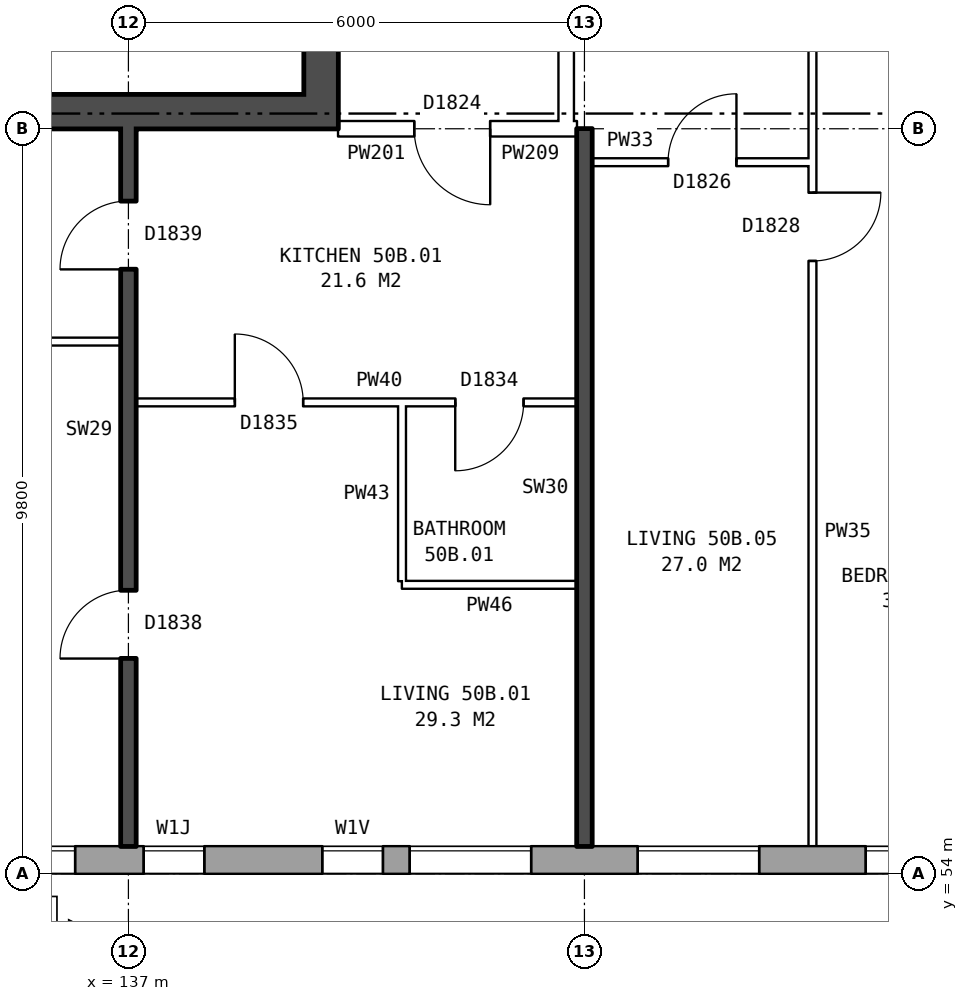
"""IFC4 building model, lengths in metres.
Left out: names, types, materials, properties, quantities, classifications, styles, units other than length and angle.
Written with IfcOpenShell. Run it as: python <this file> out.ifc"""

import sys

from ifc_helpers import new_model, si_unit, direction, frame, frame_2d, origin, place, context, subcontext, project, spatial, rectangle, extrude, element, fill, save


model = new_model("IFC4")
c1 = context("Model", 3, precision=1e-05, world=origin(), true_north=direction((0.0, 1.0)))
c2 = subcontext(c1, "Body", "Model", "MODEL_VIEW")
j1 = project(units=[si_unit("LENGTHUNIT", "METRE"), si_unit("PLANEANGLEUNIT", "RADIAN")], contexts=[c1])
p1 = place(None, origin())
s1 = spatial("IfcSite", under=j1, at=p1, CompositionType="ELEMENT")
p2 = place(p1, origin())
s2 = spatial("IfcBuilding", under=s1, at=p2, CompositionType="ELEMENT")
p3 = place(p2, frame((0.0, 0.0, 178.9)))
s3 = spatial("IfcBuildingStorey", under=s2, at=p3, CompositionType="ELEMENT", Elevation=178.9)
p4 = place(p3, frame((134.075, 54.18, 0.0), z_axis=(0.0, 0.0, 1.0), x_axis=(1.0, 0.0, 0.0)))
e1 = element("IfcWall", 1, at=p4, inside=s3, PredefinedType="STANDARD", context=c2, shape_type="SweptSolid", body=[
    extrude(rectangle(XDim=33.101, YDim=0.36, at=frame_2d((16.55, 0.0))), origin(), (0.0, 0.0, 1.0), 2.85),
])
p5 = place(p4, frame((0.625, 0.0, 0.8)))
e2 = element("IfcOpeningElement", 2, at=p5, cuts=e1, PredefinedType="OPENING", context=c2, shape_type="SweptSolid", body=[
    extrude(rectangle(XDim=1.6, YDim=1.8, at=frame_2d((0.8, 0.9))), frame((0.0, 0.19, 0.0), z_axis=(0.0, -1.0, 0.0), x_axis=(1.0, 0.0, 0.0)), (0.0, 0.0, 1.0), 0.38),
])
p6 = place(p4, frame((3.125, 0.0, 1.1)))
e3 = element("IfcOpeningElement", 3, at=p6, cuts=e1, PredefinedType="OPENING", context=c2, shape_type="SweptSolid", body=[
    extrude(rectangle(XDim=0.8, YDim=1.5, at=frame_2d((0.4, 0.75))), frame((0.0, 0.19, 0.0), z_axis=(0.0, -1.0, 0.0), x_axis=(1.0, 0.0, 0.0)), (0.0, 0.0, 1.0), 0.38),
])
p7 = place(p4, frame((6.625, 0.0, 0.8)))
e4 = element("IfcOpeningElement", 4, at=p7, cuts=e1, PredefinedType="OPENING", context=c2, shape_type="SweptSolid", body=[
    extrude(rectangle(XDim=1.6, YDim=1.8, at=frame_2d((0.8, 0.9))), frame((0.0, 0.19, 0.0), z_axis=(0.0, -1.0, 0.0), x_axis=(1.0, 0.0, 0.0)), (0.0, 0.0, 1.0), 0.38),
])
p8 = place(p4, frame((9.625, 0.0, 0.8)))
e5 = element("IfcOpeningElement", 5, at=p8, cuts=e1, PredefinedType="OPENING", context=c2, shape_type="SweptSolid", body=[
    extrude(rectangle(XDim=1.6, YDim=1.8, at=frame_2d((0.8, 0.9))), frame((0.0, 0.19, 0.0), z_axis=(0.0, -1.0, 0.0), x_axis=(1.0, 0.0, 0.0)), (0.0, 0.0, 1.0), 0.38),
])
p9 = place(p4, frame((12.625, 0.0, 0.8)))
e6 = element("IfcOpeningElement", 6, at=p9, cuts=e1, PredefinedType="OPENING", context=c2, shape_type="SweptSolid", body=[
    extrude(rectangle(XDim=1.6, YDim=1.8, at=frame_2d((0.8, 0.9))), frame((0.0, 0.19, 0.0), z_axis=(0.0, -1.0, 0.0), x_axis=(1.0, 0.0, 0.0)), (0.0, 0.0, 1.0), 0.38),
])
p10 = place(p4, frame((15.625, 0.0, 0.8)))
e7 = element("IfcOpeningElement", 7, at=p10, cuts=e1, PredefinedType="OPENING", context=c2, shape_type="SweptSolid", body=[
    extrude(rectangle(XDim=1.6, YDim=1.8, at=frame_2d((0.8, 0.9))), frame((0.0, 0.19, 0.0), z_axis=(0.0, -1.0, 0.0), x_axis=(1.0, 0.0, 0.0)), (0.0, 0.0, 1.0), 0.38),
])
p11 = place(p4, frame((18.625, 0.0, 0.8)))
e8 = element("IfcOpeningElement", 8, at=p11, cuts=e1, PredefinedType="OPENING", context=c2, shape_type="SweptSolid", body=[
    extrude(rectangle(XDim=1.6, YDim=1.8, at=frame_2d((0.8, 0.9))), frame((0.0, 0.19, 0.0), z_axis=(0.0, -1.0, 0.0), x_axis=(1.0, 0.0, 0.0)), (0.0, 0.0, 1.0), 0.38),
])
p12 = place(p4, frame((21.625, 0.0, 0.8)))
e9 = element("IfcOpeningElement", 9, at=p12, cuts=e1, PredefinedType="OPENING", context=c2, shape_type="SweptSolid", body=[
    extrude(rectangle(XDim=1.6, YDim=1.8, at=frame_2d((0.8, 0.9))), frame((0.0, 0.19, 0.0), z_axis=(0.0, -1.0, 0.0), x_axis=(1.0, 0.0, 0.0)), (0.0, 0.0, 1.0), 0.38),
])
p13 = place(p4, frame((24.625, 0.0, 0.8)))
e10 = element("IfcOpeningElement", 10, at=p13, cuts=e1, PredefinedType="OPENING", context=c2, shape_type="SweptSolid", body=[
    extrude(rectangle(XDim=1.6, YDim=1.8, at=frame_2d((0.8, 0.9))), frame((0.0, 0.19, 0.0), z_axis=(0.0, -1.0, 0.0), x_axis=(1.0, 0.0, 0.0)), (0.0, 0.0, 1.0), 0.38),
])
p14 = place(p4, frame((28.625, 0.0, 1.7)))
e11 = element("IfcOpeningElement", 11, at=p14, cuts=e1, PredefinedType="OPENING", context=c2, shape_type="SweptSolid", body=[
    extrude(rectangle(XDim=0.6, YDim=0.9, at=frame_2d((0.3, 0.45))), frame((0.0, 0.19, 0.0), z_axis=(0.0, -1.0, 0.0), x_axis=(1.0, 0.0, 0.0)), (0.0, 0.0, 1.0), 0.38),
])
p15 = place(p4, frame((30.625, 0.0, 0.8)))
e12 = element("IfcOpeningElement", 12, at=p15, cuts=e1, PredefinedType="OPENING", context=c2, shape_type="SweptSolid", body=[
    extrude(rectangle(XDim=1.6, YDim=1.8, at=frame_2d((0.8, 0.9))), frame((0.0, 0.19, 0.0), z_axis=(0.0, -1.0, 0.0), x_axis=(1.0, 0.0, 0.0)), (0.0, 0.0, 1.0), 0.38),
])
p16 = place(p4, frame((5.475, 0.0, 0.8)))
e13 = element("IfcOpeningElement", 13, at=p16, cuts=e1, PredefinedType="OPENING", context=c2, shape_type="SweptSolid", body=[
    extrude(rectangle(XDim=0.8, YDim=0.9, at=frame_2d((0.4, 0.45))), frame((0.0, 0.19, 0.0), z_axis=(0.0, -1.0, 0.0), x_axis=(1.0, 0.0, 0.0)), (0.0, 0.0, 1.0), 0.38),
])
p17 = place(p4, frame((29.525, 0.0, 0.8)))
e14 = element("IfcOpeningElement", 14, at=p17, cuts=e1, PredefinedType="OPENING", context=c2, shape_type="SweptSolid", body=[
    extrude(rectangle(XDim=0.8, YDim=1.8, at=frame_2d((0.4, 0.9))), frame((0.0, 0.19, 0.0), z_axis=(0.0, -1.0, 0.0), x_axis=(1.0, 0.0, 0.0)), (0.0, 0.0, 1.0), 0.38),
])
p18 = place(p3, frame((139.535, 63.8, 0.0), z_axis=(0.0, 0.0, 1.0), x_axis=(0.0, 1.0, 0.0)))
e15 = element("IfcWall", 15, at=p18, inside=s3, PredefinedType="SHEAR", context=c2, shape_type="SweptSolid", body=[
    extrude(rectangle(XDim=12.4, YDim=0.45, at=frame_2d((6.2, 0.0))), origin(), (0.0, 0.0, 1.0), 2.85),
])
p19 = place(p18, frame((1.325, 0.0, 0.0)))
e16 = element("IfcOpeningElement", 16, at=p19, cuts=e15, PredefinedType="OPENING", context=c2, shape_type="SweptSolid", body=[
    extrude(rectangle(XDim=1.1, YDim=2.1, at=frame_2d((0.55, 1.05))), frame((0.0, 0.235, 0.0), z_axis=(0.0, -1.0, 0.0), x_axis=(1.0, 0.0, 0.0)), (0.0, 0.0, 1.0), 0.47),
])
p20 = place(p18, frame((3.6, 0.0, 0.0)))
e17 = element("IfcOpeningElement", 17, at=p20, cuts=e15, PredefinedType="OPENING", context=c2, shape_type="SweptSolid", body=[
    extrude(rectangle(XDim=1.1, YDim=2.1, at=frame_2d((0.55, 1.05))), frame((0.0, 0.235, 0.0), z_axis=(0.0, -1.0, 0.0), x_axis=(1.0, 0.0, 0.0)), (0.0, 0.0, 1.0), 0.47),
])
p21 = place(p18, frame((5.8, 0.0, 0.0)))
e18 = element("IfcOpeningElement", 18, at=p21, cuts=e15, PredefinedType="OPENING", context=c2, shape_type="SweptSolid", body=[
    extrude(rectangle(XDim=1.1, YDim=2.1, at=frame_2d((0.55, 1.05))), frame((0.0, 0.235, 0.0), z_axis=(0.0, -1.0, 0.0), x_axis=(1.0, 0.0, 0.0)), (0.0, 0.0, 1.0), 0.47),
])
p22 = place(p18, frame((9.9, 0.0, 0.0)))
e19 = element("IfcOpeningElement", 19, at=p22, cuts=e15, PredefinedType="OPENING", context=c2, shape_type="SweptSolid", body=[
    extrude(rectangle(XDim=1.1, YDim=2.1, at=frame_2d((0.55, 1.05))), frame((0.0, 0.235, 0.0), z_axis=(0.0, -1.0, 0.0), x_axis=(1.0, 0.0, 0.0)), (0.0, 0.0, 1.0), 0.47),
])
p23 = place(p18, frame((8.125, 0.0, 0.0)))
e20 = element("IfcOpeningElement", 20, at=p23, cuts=e15, PredefinedType="OPENING", context=c2, shape_type="SweptSolid", body=[
    extrude(rectangle(XDim=0.85, YDim=2.1, at=frame_2d((0.425, 1.05))), frame((0.0, 0.235, 0.0), z_axis=(0.0, -1.0, 0.0), x_axis=(1.0, 0.0, 0.0)), (0.0, 0.0, 1.0), 0.47),
])
p24 = place(p3, frame((139.31, 64.025, 0.0), z_axis=(0.0, 0.0, 1.0), x_axis=(-1.0, 0.0, 0.0)))
e21 = element("IfcWall", 21, at=p24, inside=s3, PredefinedType="SHEAR", context=c2, shape_type="SweptSolid", body=[
    extrude(rectangle(XDim=7.5, YDim=0.45, at=frame_2d((3.75, 0.0))), origin(), (0.0, 0.0, 1.0), 2.85),
])
p25 = place(p3, frame((142.76, 63.9, 0.0), z_axis=(0.0, 0.0, 1.0), x_axis=(0.0, 1.0, 0.0)))
e22 = element("IfcWall", 22, at=p25, inside=s3, PredefinedType="PARTITIONING", context=c2, shape_type="SweptSolid", body=[
    extrude(rectangle(XDim=12.2, YDim=0.2, at=frame_2d((6.1, 0.0))), origin(), (0.0, 0.0, 1.0), 2.85),
])
p26 = place(p25, frame((5.1, 0.0, 0.0)))
e23 = element("IfcOpeningElement", 23, at=p26, cuts=e22, PredefinedType="OPENING", context=c2, shape_type="SweptSolid", body=[
    extrude(rectangle(XDim=2.0, YDim=2.1, at=frame_2d((1.0, 1.05))), frame((0.0, 0.11, 0.0), z_axis=(0.0, -1.0, 0.0), x_axis=(1.0, 0.0, 0.0)), (0.0, 0.0, 1.0), 0.22),
])
p27 = place(p3, frame((140.6, 57.8, 0.0), z_axis=(0.0, 0.0, 1.0), x_axis=(1.0, 0.0, 0.0)))
e24 = element("IfcWall", 24, at=p27, inside=s3, PredefinedType="PARTITIONING", context=c2, shape_type="SweptSolid", body=[
    extrude(rectangle(XDim=2.3, YDim=0.1, at=frame_2d((1.15, 0.0))), origin(), (0.0, 0.0, 1.0), 2.85),
])
p28 = place(p3, frame((137.1, 60.2, 0.0), z_axis=(0.0, 0.0, 1.0), x_axis=(1.0, 0.0, 0.0)))
e25 = element("IfcWall", 25, at=p28, inside=s3, PredefinedType="PARTITIONING", context=c2, shape_type="SweptSolid", body=[
    extrude(rectangle(XDim=5.8, YDim=0.1, at=frame_2d((2.9, 0.0))), origin(), (0.0, 0.0, 1.0), 2.85),
])
p29 = place(p28, frame((1.3, 0.0, 0.0)))
e26 = element("IfcOpeningElement", 26, at=p29, cuts=e25, PredefinedType="OPENING", context=c2, shape_type="SweptSolid", body=[
    extrude(rectangle(XDim=0.9, YDim=2.1, at=frame_2d((0.45, 1.05))), frame((0.0, 0.06, 0.0), z_axis=(0.0, -1.0, 0.0), x_axis=(1.0, 0.0, 0.0)), (0.0, 0.0, 1.0), 0.12),
])
p30 = place(p28, frame((4.2, 0.0, 0.0)))
e27 = element("IfcOpeningElement", 27, at=p30, cuts=e25, PredefinedType="OPENING", context=c2, shape_type="SweptSolid", body=[
    extrude(rectangle(XDim=0.9, YDim=2.1, at=frame_2d((0.45, 1.05))), frame((0.0, 0.06, 0.0), z_axis=(0.0, -1.0, 0.0), x_axis=(1.0, 0.0, 0.0)), (0.0, 0.0, 1.0), 0.12),
])
p31 = place(p3, frame((131.36, 61.0, 0.0), z_axis=(0.0, 0.0, 1.0), x_axis=(1.0, 0.0, 0.0)))
e28 = element("IfcWall", 28, at=p31, inside=s3, PredefinedType="PARTITIONING", context=c2, shape_type="SweptSolid", body=[
    extrude(rectangle(XDim=5.54, YDim=0.1, at=frame_2d((2.77, 0.0))), origin(), (0.0, 0.0, 1.0), 2.85),
])
p32 = place(p3, frame((143.1, 63.36, 0.0), z_axis=(0.0, 0.0, 1.0), x_axis=(1.0, 0.0, 0.0)))
e29 = element("IfcWall", 29, at=p32, inside=s3, PredefinedType="PARTITIONING", context=c2, shape_type="SweptSolid", body=[
    extrude(rectangle(XDim=2.9, YDim=0.1, at=frame_2d((1.45, 0.0))), origin(), (0.0, 0.0, 1.0), 2.85),
])
p33 = place(p32, frame((1.0, 0.0, 0.0)))
e30 = element("IfcOpeningElement", 30, at=p33, cuts=e29, PredefinedType="OPENING", context=c2, shape_type="SweptSolid", body=[
    extrude(rectangle(XDim=0.9, YDim=2.1, at=frame_2d((0.45, 1.05))), frame((0.0, 0.06, 0.0), z_axis=(0.0, -1.0, 0.0), x_axis=(1.0, 0.0, 0.0)), (0.0, 0.0, 1.0), 0.12),
])
p34 = place(p3, frame((139.76, 63.8, 0.0), z_axis=(0.0, 0.0, 1.0), x_axis=(1.0, 0.0, 0.0)))
e31 = element("IfcWall", 31, at=p34, inside=s3, PredefinedType="PARTITIONING", context=c2, shape_type="SweptSolid", body=[
    extrude(rectangle(XDim=3.0, YDim=0.2, at=frame_2d((1.5, 0.0))), origin(), (0.0, 0.0, 1.0), 2.85),
])
p35 = place(p34, frame((1.0, 0.0, 0.0)))
e32 = element("IfcOpeningElement", 32, at=p35, cuts=e31, PredefinedType="OPENING", context=c2, shape_type="SweptSolid", body=[
    extrude(rectangle(XDim=1.0, YDim=2.1, at=frame_2d((0.5, 1.05))), frame((0.0, 0.11, 0.0), z_axis=(0.0, -1.0, 0.0), x_axis=(1.0, 0.0, 0.0)), (0.0, 0.0, 1.0), 0.22),
])
p36 = place(p3, frame((142.76, 63.8, 0.0), z_axis=(0.0, 0.0, 1.0), x_axis=(1.0, 0.0, 0.0)))
e33 = element("IfcWall", 33, at=p36, inside=s3, PredefinedType="PARTITIONING", context=c2, shape_type="SweptSolid", body=[
    extrude(rectangle(XDim=0.14, YDim=0.2, at=frame_2d((0.07, 0.0))), origin(), (0.0, 0.0, 1.0), 2.85),
])
p37 = place(p3, frame((137.0, 54.36, 0.0), z_axis=(0.0, 0.0, 1.0), x_axis=(0.0, 1.0, 0.0)))
e34 = element("IfcWall", 34, at=p37, inside=s3, PredefinedType="SOLIDWALL", context=c2, shape_type="SweptSolid", body=[
    extrude(rectangle(XDim=9.44, YDim=0.2, at=frame_2d((4.72, 0.0))), origin(), (0.0, 0.0, 1.0), 2.85),
])
p38 = place(p37, frame((2.47, 0.0, 0.0)))
e35 = element("IfcOpeningElement", 35, at=p38, cuts=e34, PredefinedType="OPENING", context=c2, shape_type="SweptSolid", body=[
    extrude(rectangle(XDim=0.9, YDim=2.1, at=frame_2d((0.45, 1.05))), frame((0.0, 0.11, 0.0), z_axis=(0.0, -1.0, 0.0), x_axis=(1.0, 0.0, 0.0)), (0.0, 0.0, 1.0), 0.22),
])
p39 = place(p37, frame((7.59, 0.0, 0.0)))
e36 = element("IfcOpeningElement", 36, at=p39, cuts=e34, PredefinedType="OPENING", context=c2, shape_type="SweptSolid", body=[
    extrude(rectangle(XDim=0.9, YDim=2.1, at=frame_2d((0.45, 1.05))), frame((0.0, 0.11, 0.0), z_axis=(0.0, -1.0, 0.0), x_axis=(1.0, 0.0, 0.0)), (0.0, 0.0, 1.0), 0.22),
])
p40 = place(p3, frame((140.6, 57.85, 0.0), z_axis=(0.0, 0.0, 1.0), x_axis=(0.0, 1.0, 0.0)))
e37 = element("IfcWall", 37, at=p40, inside=s3, PredefinedType="PARTITIONING", context=c2, shape_type="SweptSolid", body=[
    extrude(rectangle(XDim=2.3, YDim=0.1, at=frame_2d((1.15, 0.0))), origin(), (0.0, 0.0, 1.0), 2.85),
])
p41 = place(p3, frame((143.0, 54.36, 0.0), z_axis=(0.0, 0.0, 1.0), x_axis=(0.0, 1.0, 0.0)))
e38 = element("IfcWall", 38, at=p41, inside=s3, PredefinedType="SOLIDWALL", context=c2, shape_type="SweptSolid", body=[
    extrude(rectangle(XDim=9.44, YDim=0.2, at=frame_2d((4.72, 0.0))), origin(), (0.0, 0.0, 1.0), 2.85),
])
p42 = place(p3, frame((146.0, 54.36, 0.0), z_axis=(0.0, 0.0, 1.0), x_axis=(0.0, 1.0, 0.0)))
e39 = element("IfcWall", 39, at=p42, inside=s3, PredefinedType="PARTITIONING", context=c2, shape_type="SweptSolid", body=[
    extrude(rectangle(XDim=14.34, YDim=0.1, at=frame_2d((7.17, 0.0))), origin(), (0.0, 0.0, 1.0), 2.85),
])
p43 = place(p42, frame((7.7, 0.0, 0.0)))
e40 = element("IfcOpeningElement", 40, at=p43, cuts=e39, PredefinedType="OPENING", context=c2, shape_type="SweptSolid", body=[
    extrude(rectangle(XDim=0.9, YDim=2.1, at=frame_2d((0.45, 1.05))), frame((0.0, 0.06, 0.0), z_axis=(0.0, -1.0, 0.0), x_axis=(1.0, 0.0, 0.0)), (0.0, 0.0, 1.0), 0.12),
])
p44 = place(p42, frame((13.04, 0.0, 0.0)))
e41 = element("IfcOpeningElement", 41, at=p44, cuts=e39, PredefinedType="OPENING", context=c2, shape_type="SweptSolid", body=[
    extrude(rectangle(XDim=0.9, YDim=2.1, at=frame_2d((0.45, 1.05))), frame((0.0, 0.06, 0.0), z_axis=(0.0, -1.0, 0.0), x_axis=(1.0, 0.0, 0.0)), (0.0, 0.0, 1.0), 0.12),
])
p45 = place(p5, origin())
e42 = element("IfcWindow", 42, at=p45, inside=s3, PartitioningType="SINGLE_PANEL", PredefinedType="WINDOW", context=c2, shape_type="SweptSolid", body=[
    extrude(rectangle(XDim=1.6, YDim=1.8, at=frame_2d((0.8, 0.9))), frame((0.0, 0.15, 0.0), z_axis=(0.0, -1.0, 0.0), x_axis=(1.0, 0.0, 0.0)), (0.0, 0.0, 1.0), 0.06),
])
fill(e2, e42)
p46 = place(p6, origin())
e43 = element("IfcWindow", 43, at=p46, inside=s3, PartitioningType="SINGLE_PANEL", PredefinedType="WINDOW", context=c2, shape_type="SweptSolid", body=[
    extrude(rectangle(XDim=0.8, YDim=1.5, at=frame_2d((0.4, 0.75))), frame((0.0, 0.15, 0.0), z_axis=(0.0, -1.0, 0.0), x_axis=(1.0, 0.0, 0.0)), (0.0, 0.0, 1.0), 0.06),
])
fill(e3, e43)
p47 = place(p7, origin())
e44 = element("IfcWindow", 44, at=p47, inside=s3, PartitioningType="SINGLE_PANEL", PredefinedType="WINDOW", context=c2, shape_type="SweptSolid", body=[
    extrude(rectangle(XDim=1.6, YDim=1.8, at=frame_2d((0.8, 0.9))), frame((0.0, 0.15, 0.0), z_axis=(0.0, -1.0, 0.0), x_axis=(1.0, 0.0, 0.0)), (0.0, 0.0, 1.0), 0.06),
])
fill(e4, e44)
p48 = place(p8, origin())
e45 = element("IfcWindow", 45, at=p48, inside=s3, PartitioningType="SINGLE_PANEL", PredefinedType="WINDOW", context=c2, shape_type="SweptSolid", body=[
    extrude(rectangle(XDim=1.6, YDim=1.8, at=frame_2d((0.8, 0.9))), frame((0.0, 0.15, 0.0), z_axis=(0.0, -1.0, 0.0), x_axis=(1.0, 0.0, 0.0)), (0.0, 0.0, 1.0), 0.06),
])
fill(e5, e45)
p49 = place(p9, origin())
e46 = element("IfcWindow", 46, at=p49, inside=s3, PartitioningType="SINGLE_PANEL", PredefinedType="WINDOW", context=c2, shape_type="SweptSolid", body=[
    extrude(rectangle(XDim=1.6, YDim=1.8, at=frame_2d((0.8, 0.9))), frame((0.0, 0.15, 0.0), z_axis=(0.0, -1.0, 0.0), x_axis=(1.0, 0.0, 0.0)), (0.0, 0.0, 1.0), 0.06),
])
fill(e6, e46)
p50 = place(p38, origin())
e47 = element("IfcDoor", 47, at=p50, inside=s3, OperationType="SINGLE_SWING_LEFT", PredefinedType="DOOR", context=c2, shape_type="SweptSolid", body=[
    extrude(rectangle(XDim=0.9, YDim=2.1, at=frame_2d((0.45, 1.05))), frame((0.0, 0.025, 0.0), z_axis=(0.0, -1.0, 0.0), x_axis=(1.0, 0.0, 0.0)), (0.0, 0.0, 1.0), 0.05),
])
fill(e35, e47)
p51 = place(p39, origin())
e48 = element("IfcDoor", 48, at=p51, inside=s3, OperationType="SINGLE_SWING_LEFT", PredefinedType="DOOR", context=c2, shape_type="SweptSolid", body=[
    extrude(rectangle(XDim=0.9, YDim=2.1, at=frame_2d((0.45, 1.05))), frame((0.0, 0.025, 0.0), z_axis=(0.0, -1.0, 0.0), x_axis=(1.0, 0.0, 0.0)), (0.0, 0.0, 1.0), 0.05),
])
fill(e36, e48)
p52 = place(p35, frame((1.0, 0.0, 0.0), z_axis=(0.0, 0.0, 1.0), x_axis=(-1.0, 0.0, 0.0)))
e49 = element("IfcDoor", 49, at=p52, inside=s3, OperationType="SINGLE_SWING_LEFT", PredefinedType="DOOR", context=c2, shape_type="SweptSolid", body=[
    extrude(rectangle(XDim=1.0, YDim=2.1, at=frame_2d((0.5, 1.05))), frame((0.0, 0.025, 0.0), z_axis=(0.0, -1.0, 0.0), x_axis=(1.0, 0.0, 0.0)), (0.0, 0.0, 1.0), 0.05),
])
fill(e32, e49)
p53 = place(p29, origin())
e50 = element("IfcDoor", 50, at=p53, inside=s3, OperationType="SINGLE_SWING_LEFT", PredefinedType="DOOR", context=c2, shape_type="SweptSolid", body=[
    extrude(rectangle(XDim=0.9, YDim=2.1, at=frame_2d((0.45, 1.05))), frame((0.0, 0.025, 0.0), z_axis=(0.0, -1.0, 0.0), x_axis=(1.0, 0.0, 0.0)), (0.0, 0.0, 1.0), 0.05),
])
fill(e26, e50)
p54 = place(p30, frame((0.9, 0.0, 0.0), z_axis=(0.0, 0.0, 1.0), x_axis=(-1.0, 0.0, 0.0)))
e51 = element("IfcDoor", 51, at=p54, inside=s3, OperationType="SINGLE_SWING_RIGHT", PredefinedType="DOOR", context=c2, shape_type="SweptSolid", body=[
    extrude(rectangle(XDim=0.9, YDim=2.1, at=frame_2d((0.45, 1.05))), frame((0.0, 0.025, 0.0), z_axis=(0.0, -1.0, 0.0), x_axis=(1.0, 0.0, 0.0)), (0.0, 0.0, 1.0), 0.05),
])
fill(e27, e51)
p55 = place(p43, frame((0.9, 0.0, 0.0), z_axis=(0.0, 0.0, 1.0), x_axis=(-1.0, 0.0, 0.0)))
e52 = element("IfcDoor", 52, at=p55, inside=s3, OperationType="SINGLE_SWING_LEFT", PredefinedType="DOOR", context=c2, shape_type="SweptSolid", body=[
    extrude(rectangle(XDim=0.9, YDim=2.1, at=frame_2d((0.45, 1.05))), frame((0.0, 0.025, 0.0), z_axis=(0.0, -1.0, 0.0), x_axis=(1.0, 0.0, 0.0)), (0.0, 0.0, 1.0), 0.05),
])
fill(e40, e52)
p56 = place(p33, origin())
e53 = element("IfcDoor", 53, at=p56, inside=s3, OperationType="SINGLE_SWING_RIGHT", PredefinedType="DOOR", context=c2, shape_type="SweptSolid", body=[
    extrude(rectangle(XDim=0.9, YDim=2.1, at=frame_2d((0.45, 1.05))), frame((0.0, 0.025, 0.0), z_axis=(0.0, -1.0, 0.0), x_axis=(1.0, 0.0, 0.0)), (0.0, 0.0, 1.0), 0.05),
])
fill(e30, e53)
p57 = place(p16, origin())
e54 = element("IfcWindow", 54, at=p57, inside=s3, PartitioningType="SINGLE_PANEL", PredefinedType="WINDOW", context=c2, shape_type="SweptSolid", body=[
    extrude(rectangle(XDim=0.8, YDim=0.9, at=frame_2d((0.4, 0.45))), frame((0.0, 0.15, 0.0), z_axis=(0.0, -1.0, 0.0), x_axis=(1.0, 0.0, 0.0)), (0.0, 0.0, 1.0), 0.06),
])
fill(e13, e54)
save(model, sys.argv[1])
